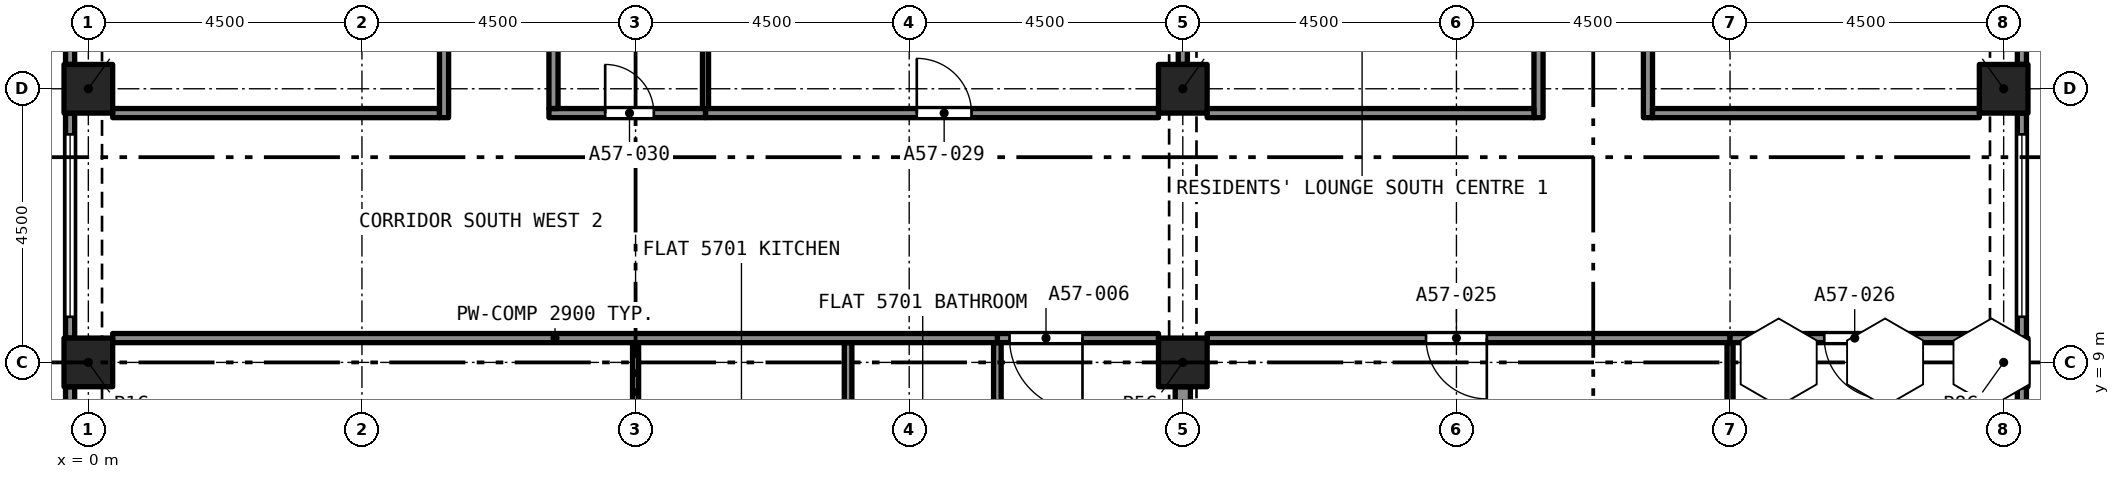
"""IFC4 building model, lengths in metres.
Left out: names, types, materials, properties, quantities, classifications, styles, units other than length and angle.
Written with IfcOpenShell. Run it as: python <this file> out.ifc"""

import sys

from ifc_helpers import new_model, si_unit, direction, frame, frame_2d, origin, origin_2d, place, context, subcontext, project, spatial, rectangle, extrude, element, fill, save


model = new_model("IFC4")
c1 = context("Model", 3, precision=1e-05, world=origin(), true_north=direction((0.0, 1.0)))
c2 = subcontext(c1, "Body", "Model", "MODEL_VIEW")
j1 = project(units=[si_unit("LENGTHUNIT", "METRE"), si_unit("PLANEANGLEUNIT", "RADIAN")], contexts=[c1])
p1 = place(None, origin())
s1 = spatial("IfcSite", under=j1, at=p1, CompositionType="ELEMENT")
p2 = place(p1, origin())
s2 = spatial("IfcBuilding", under=s1, at=p2, CompositionType="ELEMENT")
p3 = place(p2, frame((0.0, 0.0, 206.895)))
s3 = spatial("IfcBuildingStorey", under=s2, at=p3, CompositionType="ELEMENT", Elevation=206.895)
for number, where, z_axis, x_axis in (
    (1, (0.0, 9.0, 0.0), (0.0, 0.0, 1.0), (1.0, 0.0, 0.0)),
    (2, (18.0, 9.0, 0.0), (0.0, 0.0, 1.0), (1.0, 0.0, 0.0)),
    (3, (31.5, 9.0, 0.0), (0.0, 0.0, 1.0), (1.0, 0.0, 0.0)),
    (4, (0.0, 13.5, 0.0), (0.0, 0.0, 1.0), (1.0, 0.0, 0.0)),
    (5, (18.0, 13.5, 0.0), (0.0, 0.0, 1.0), (1.0, 0.0, 0.0)),
    (6, (31.5, 13.5, 0.0), (0.0, 0.0, 1.0), (1.0, 0.0, 0.0)),
):
    element("IfcColumn", number, at=place(p3, frame(where, z_axis=z_axis, x_axis=x_axis)), inside=s3, PredefinedType="COLUMN", context=c2, shape_type="SweptSolid", body=[
        extrude(rectangle(XDim=0.8, YDim=0.8, at=origin_2d()), origin(), (0.0, 0.0, 1.0), 3.2),
    ])
p4 = place(p3, frame((31.8, 8.6, 0.0), z_axis=(0.0, 0.0, 1.0), x_axis=(0.0, -1.0, 0.0)))
e7 = element("IfcWall", 7, at=p4, inside=s3, PredefinedType="SOLIDWALL", context=c2, shape_type="SweptSolid", body=[
    extrude(rectangle(XDim=3.7, YDim=0.15, at=frame_2d((1.85, 0.0))), origin(), (0.0, 0.0, 1.0), 3.2),
])
p5 = place(p4, frame((0.35, 0.0, 0.45)))
e8 = element("IfcOpeningElement", 8, at=p5, cuts=e7, PredefinedType="OPENING", context=c2, shape_type="SweptSolid", body=[
    extrude(rectangle(XDim=3.0, YDim=1.95, at=frame_2d((1.5, 0.975))), frame((0.0, 0.085, 0.0), z_axis=(0.0, -1.0, 0.0), x_axis=(1.0, 0.0, 0.0)), (0.0, 0.0, 1.0), 0.17),
])
p6 = place(p3, frame((31.8, 13.1, 0.0), z_axis=(0.0, 0.0, 1.0), x_axis=(0.0, -1.0, 0.0)))
e9 = element("IfcWall", 9, at=p6, inside=s3, PredefinedType="SOLIDWALL", context=c2, shape_type="SweptSolid", body=[
    extrude(rectangle(XDim=3.7, YDim=0.15, at=frame_2d((1.85, 0.0))), origin(), (0.0, 0.0, 1.0), 3.2),
])
p7 = place(p6, frame((0.35, 0.0, 0.45)))
e10 = element("IfcOpeningElement", 10, at=p7, cuts=e9, PredefinedType="OPENING", context=c2, shape_type="SweptSolid", body=[
    extrude(rectangle(XDim=3.0, YDim=1.95, at=frame_2d((1.5, 0.975))), frame((0.0, 0.085, 0.0), z_axis=(0.0, -1.0, 0.0), x_axis=(1.0, 0.0, 0.0)), (0.0, 0.0, 1.0), 0.17),
])
p8 = place(p3, frame((31.8, 17.6, 0.0), z_axis=(0.0, 0.0, 1.0), x_axis=(0.0, -1.0, 0.0)))
e11 = element("IfcWall", 11, at=p8, inside=s3, PredefinedType="SOLIDWALL", context=c2, shape_type="SweptSolid", body=[
    extrude(rectangle(XDim=3.7, YDim=0.15, at=frame_2d((1.85, 0.0))), origin(), (0.0, 0.0, 1.0), 3.2),
])
p9 = place(p8, frame((0.35, 0.0, 0.45)))
e12 = element("IfcOpeningElement", 12, at=p9, cuts=e11, PredefinedType="OPENING", context=c2, shape_type="SweptSolid", body=[
    extrude(rectangle(XDim=3.0, YDim=1.95, at=frame_2d((1.5, 0.975))), frame((0.0, 0.085, 0.0), z_axis=(0.0, -1.0, 0.0), x_axis=(1.0, 0.0, 0.0)), (0.0, 0.0, 1.0), 0.17),
])
p10 = place(p3, frame((-0.3, 13.9, 0.0), z_axis=(0.0, 0.0, 1.0), x_axis=(0.0, 1.0, 0.0)))
e13 = element("IfcWall", 13, at=p10, inside=s3, PredefinedType="SOLIDWALL", context=c2, shape_type="SweptSolid", body=[
    extrude(rectangle(XDim=3.7, YDim=0.15, at=frame_2d((1.85, 0.0))), origin(), (0.0, 0.0, 1.0), 3.2),
])
p11 = place(p10, frame((0.35, 0.0, 0.45)))
e14 = element("IfcOpeningElement", 14, at=p11, cuts=e13, PredefinedType="OPENING", context=c2, shape_type="SweptSolid", body=[
    extrude(rectangle(XDim=3.0, YDim=1.95, at=frame_2d((1.5, 0.975))), frame((0.0, 0.085, 0.0), z_axis=(0.0, -1.0, 0.0), x_axis=(1.0, 0.0, 0.0)), (0.0, 0.0, 1.0), 0.17),
])
p12 = place(p3, frame((-0.3, 9.4, 0.0), z_axis=(0.0, 0.0, 1.0), x_axis=(0.0, 1.0, 0.0)))
e15 = element("IfcWall", 15, at=p12, inside=s3, PredefinedType="SOLIDWALL", context=c2, shape_type="SweptSolid", body=[
    extrude(rectangle(XDim=3.7, YDim=0.15, at=frame_2d((1.85, 0.0))), origin(), (0.0, 0.0, 1.0), 3.2),
])
p13 = place(p12, frame((0.35, 0.0, 0.45)))
e16 = element("IfcOpeningElement", 16, at=p13, cuts=e15, PredefinedType="OPENING", context=c2, shape_type="SweptSolid", body=[
    extrude(rectangle(XDim=3.0, YDim=1.95, at=frame_2d((1.5, 0.975))), frame((0.0, 0.085, 0.0), z_axis=(0.0, -1.0, 0.0), x_axis=(1.0, 0.0, 0.0)), (0.0, 0.0, 1.0), 0.17),
])
p14 = place(p3, frame((-0.3, 4.9, 0.0), z_axis=(0.0, 0.0, 1.0), x_axis=(0.0, 1.0, 0.0)))
e17 = element("IfcWall", 17, at=p14, inside=s3, PredefinedType="SOLIDWALL", context=c2, shape_type="SweptSolid", body=[
    extrude(rectangle(XDim=3.7, YDim=0.15, at=frame_2d((1.85, 0.0))), origin(), (0.0, 0.0, 1.0), 3.2),
])
p15 = place(p14, frame((0.35, 0.0, 0.45)))
e18 = element("IfcOpeningElement", 18, at=p15, cuts=e17, PredefinedType="OPENING", context=c2, shape_type="SweptSolid", body=[
    extrude(rectangle(XDim=3.0, YDim=1.95, at=frame_2d((1.5, 0.975))), frame((0.0, 0.085, 0.0), z_axis=(0.0, -1.0, 0.0), x_axis=(1.0, 0.0, 0.0)), (0.0, 0.0, 1.0), 0.17),
])
for number, where, z_axis, x_axis in (
    (19, (14.95, 5.883, 0.0), (0.0, 0.0, 1.0), (0.0, 1.0, 0.0)),
    (20, (12.495, 5.883, 0.0), (0.0, 0.0, 1.0), (0.0, 1.0, 0.0)),
):
    element("IfcWall", number, at=place(p3, frame(where, z_axis=z_axis, x_axis=x_axis)), inside=s3, PredefinedType="PARTITIONING", context=c2, shape_type="SweptSolid", body=[
        extrude(rectangle(XDim=3.442, YDim=0.125, at=frame_2d((1.721, 0.0))), origin(), (0.0, 0.0, 1.0), 2.9),
    ])
p16 = place(p3, frame((18.0, 4.9, 0.0), z_axis=(0.0, 0.0, 1.0), x_axis=(0.0, 1.0, 0.0)))
e21 = element("IfcWall", 21, at=p16, inside=s3, PredefinedType="PARTITIONING", context=c2, shape_type="SweptSolid", body=[
    extrude(rectangle(XDim=3.7, YDim=0.25, at=frame_2d((1.85, 0.0))), origin(), (0.0, 0.0, 1.0), 2.38),
])
p17 = place(p3, frame((17.6, 9.4, 0.0), z_axis=(0.0, 0.0, 1.0), x_axis=(-1.0, 0.0, 0.0)))
e22 = element("IfcWall", 22, at=p17, inside=s3, PredefinedType="PARTITIONING", context=c2, shape_type="SweptSolid", body=[
    extrude(rectangle(XDim=2.65, YDim=0.15, at=frame_2d((1.325, 0.0))), origin(), (0.0, 0.0, 1.0), 2.9),
])
p18 = place(p17, frame((1.25, 0.0, 0.0)))
e23 = element("IfcOpeningElement", 23, at=p18, cuts=e22, PredefinedType="OPENING", context=c2, shape_type="SweptSolid", body=[
    extrude(rectangle(XDim=1.2, YDim=2.4, at=frame_2d((0.6, 1.2))), frame((0.0, 0.085, 0.0), z_axis=(0.0, -1.0, 0.0), x_axis=(1.0, 0.0, 0.0)), (0.0, 0.0, 1.0), 0.17),
])
p19 = place(p3, frame((9.0, 5.82, 0.0), z_axis=(0.0, 0.0, 1.0), x_axis=(0.0, 1.0, 0.0)))
e24 = element("IfcWall", 24, at=p19, inside=s3, PredefinedType="PARTITIONING", context=c2, shape_type="SweptSolid", body=[
    extrude(rectangle(XDim=3.505, YDim=0.1, at=frame_2d((1.752, 0.0))), origin(), (0.0, 0.0, 1.0), 2.9),
])
p20 = place(p3, frame((0.4, 9.4, 0.0), z_axis=(0.0, 0.0, 1.0), x_axis=(1.0, 0.0, 0.0)))
e25 = element("IfcWall", 25, at=p20, inside=s3, PredefinedType="PARTITIONING", context=c2, shape_type="SweptSolid", body=[
    extrude(rectangle(XDim=14.55, YDim=0.15, at=frame_2d((7.275, 0.0))), origin(), (0.0, 0.0, 1.0), 2.9),
])
p21 = place(p3, frame((27.0, 0.433, 0.0), z_axis=(0.0, 0.0, 1.0), x_axis=(0.0, 1.0, 0.0)))
e26 = element("IfcWall", 26, at=p21, inside=s3, PredefinedType="PARTITIONING", context=c2, shape_type="SweptSolid", body=[
    extrude(rectangle(XDim=8.892, YDim=0.1, at=frame_2d((4.446, 0.0))), origin(), (0.0, 0.0, 1.0), 2.75),
])
p22 = place(p3, frame((27.0, 9.4, 0.0), z_axis=(0.0, 0.0, 1.0), x_axis=(-1.0, 0.0, 0.0)))
e27 = element("IfcWall", 27, at=p22, inside=s3, PredefinedType="PARTITIONING", context=c2, shape_type="SweptSolid", body=[
    extrude(rectangle(XDim=8.6, YDim=0.15, at=frame_2d((4.3, 0.0))), origin(), (0.0, 0.0, 1.0), 2.75),
])
p23 = place(p22, frame((4.0, 0.0, 0.0)))
e28 = element("IfcOpeningElement", 28, at=p23, cuts=e27, PredefinedType="OPENING", context=c2, shape_type="SweptSolid", body=[
    extrude(rectangle(XDim=1.0, YDim=2.1, at=frame_2d((0.5, 1.05))), frame((0.0, 0.085, 0.0), z_axis=(0.0, -1.0, 0.0), x_axis=(1.0, 0.0, 0.0)), (0.0, 0.0, 1.0), 0.17),
])
p24 = place(p3, frame((31.1, 9.4, 0.0), z_axis=(0.0, 0.0, 1.0), x_axis=(-1.0, 0.0, 0.0)))
e29 = element("IfcWall", 29, at=p24, inside=s3, PredefinedType="PARTITIONING", context=c2, shape_type="SweptSolid", body=[
    extrude(rectangle(XDim=4.1, YDim=0.15, at=frame_2d((2.05, 0.0))), origin(), (0.0, 0.0, 1.0), 2.75),
])
p25 = place(p24, frame((1.55, 0.0, 0.0)))
e30 = element("IfcOpeningElement", 30, at=p25, cuts=e29, PredefinedType="OPENING", context=c2, shape_type="SweptSolid", body=[
    extrude(rectangle(XDim=1.0, YDim=2.1, at=frame_2d((0.5, 1.05))), frame((0.0, 0.085, 0.0), z_axis=(0.0, -1.0, 0.0), x_axis=(1.0, 0.0, 0.0)), (0.0, 0.0, 1.0), 0.17),
])
p26 = place(p3, frame((23.85, 13.025, 0.0), z_axis=(0.0, 0.0, 1.0), x_axis=(0.0, 1.0, 0.0)))
e31 = element("IfcWall", 31, at=p26, inside=s3, PredefinedType="PARTITIONING", context=c2, shape_type="SweptSolid", body=[
    extrude(rectangle(XDim=9.55, YDim=0.15, at=frame_2d((4.775, 0.0))), origin(), (0.0, 0.0, 1.0), 2.75),
])
p27 = place(p26, frame((4.275, 0.0, 0.0)))
e32 = element("IfcOpeningElement", 32, at=p27, cuts=e31, PredefinedType="OPENING", context=c2, shape_type="SweptSolid", body=[
    extrude(rectangle(XDim=1.0, YDim=2.1, at=frame_2d((0.5, 1.05))), frame((0.0, 0.085, 0.0), z_axis=(0.0, -1.0, 0.0), x_axis=(1.0, 0.0, 0.0)), (0.0, 0.0, 1.0), 0.17),
])
p28 = place(p3, frame((25.65, 22.575, 0.0), z_axis=(0.0, 0.0, 1.0), x_axis=(0.0, -1.0, 0.0)))
e33 = element("IfcWall", 33, at=p28, inside=s3, PredefinedType="PARTITIONING", context=c2, shape_type="SweptSolid", body=[
    extrude(rectangle(XDim=9.55, YDim=0.15, at=frame_2d((4.775, 0.0))), origin(), (0.0, 0.0, 1.0), 2.75),
])
p29 = place(p28, frame((4.275, 0.0, 0.0)))
e34 = element("IfcOpeningElement", 34, at=p29, cuts=e33, PredefinedType="OPENING", context=c2, shape_type="SweptSolid", body=[
    extrude(rectangle(XDim=1.0, YDim=2.1, at=frame_2d((0.5, 1.05))), frame((0.0, 0.085, 0.0), z_axis=(0.0, -1.0, 0.0), x_axis=(1.0, 0.0, 0.0)), (0.0, 0.0, 1.0), 0.17),
])
for number, where, z_axis, x_axis in (
    (35, (18.4, 13.1, 0.0), (0.0, 0.0, 1.0), (1.0, 0.0, 0.0)),
    (36, (25.725, 13.1, 0.0), (0.0, 0.0, 1.0), (1.0, 0.0, 0.0)),
):
    element("IfcWall", number, at=place(p3, frame(where, z_axis=z_axis, x_axis=x_axis)), inside=s3, PredefinedType="PARTITIONING", context=c2, shape_type="SweptSolid", body=[
        extrude(rectangle(XDim=5.375, YDim=0.15, at=frame_2d((2.688, 0.0))), origin(), (0.0, 0.0, 1.0), 2.75),
    ])
p30 = place(p3, frame((10.15, 13.1, 0.0), z_axis=(0.0, 0.0, 1.0), x_axis=(1.0, 0.0, 0.0)))
e37 = element("IfcWall", 37, at=p30, inside=s3, PredefinedType="PARTITIONING", context=c2, shape_type="SweptSolid", body=[
    extrude(rectangle(XDim=7.45, YDim=0.15, at=frame_2d((3.725, 0.0))), origin(), (0.0, 0.0, 1.0), 2.9),
])
p31 = place(p30, frame((3.475, 0.0, 0.0)))
e38 = element("IfcOpeningElement", 38, at=p31, cuts=e37, PredefinedType="OPENING", context=c2, shape_type="SweptSolid", body=[
    extrude(rectangle(XDim=0.9, YDim=2.1, at=frame_2d((0.45, 1.05))), frame((0.0, 0.085, 0.0), z_axis=(0.0, -1.0, 0.0), x_axis=(1.0, 0.0, 0.0)), (0.0, 0.0, 1.0), 0.17),
])
p32 = place(p3, frame((7.575, 13.1, 0.0), z_axis=(0.0, 0.0, 1.0), x_axis=(1.0, 0.0, 0.0)))
e39 = element("IfcWall", 39, at=p32, inside=s3, PredefinedType="PARTITIONING", context=c2, shape_type="SweptSolid", body=[
    extrude(rectangle(XDim=2.575, YDim=0.15, at=frame_2d((1.288, 0.0))), origin(), (0.0, 0.0, 1.0), 2.9),
])
p33 = place(p32, frame((0.925, 0.0, 0.0)))
e40 = element("IfcOpeningElement", 40, at=p33, cuts=e39, PredefinedType="OPENING", context=c2, shape_type="SweptSolid", body=[
    extrude(rectangle(XDim=0.8, YDim=2.1, at=frame_2d((0.4, 1.05))), frame((0.0, 0.085, 0.0), z_axis=(0.0, -1.0, 0.0), x_axis=(1.0, 0.0, 0.0)), (0.0, 0.0, 1.0), 0.17),
])
p34 = place(p3, frame((0.4, 13.1, 0.0), z_axis=(0.0, 0.0, 1.0), x_axis=(1.0, 0.0, 0.0)))
e41 = element("IfcWall", 41, at=p34, inside=s3, PredefinedType="PARTITIONING", context=c2, shape_type="SweptSolid", body=[
    extrude(rectangle(XDim=5.375, YDim=0.15, at=frame_2d((2.688, 0.0))), origin(), (0.0, 0.0, 1.0), 2.9),
])
p35 = place(p3, frame((18.0, 13.9, 0.0), z_axis=(0.0, 0.0, 1.0), x_axis=(0.0, 1.0, 0.0)))
e42 = element("IfcWall", 42, at=p35, inside=s3, PredefinedType="PARTITIONING", context=c2, shape_type="SweptSolid", body=[
    extrude(rectangle(XDim=3.4, YDim=0.15, at=frame_2d((1.7, 0.0))), origin(), (0.0, 0.0, 1.0), 2.38),
])
p36 = place(p3, frame((7.65, 13.175, 0.0), z_axis=(0.0, 0.0, 1.0), x_axis=(0.0, 1.0, 0.0)))
e43 = element("IfcWall", 43, at=p36, inside=s3, PredefinedType="PARTITIONING", context=c2, shape_type="SweptSolid", body=[
    extrude(rectangle(XDim=4.125, YDim=0.15, at=frame_2d((2.062, 0.0))), origin(), (0.0, 0.0, 1.0), 2.9),
])
p37 = place(p3, frame((5.85, 13.025, 0.0), z_axis=(0.0, 0.0, 1.0), x_axis=(0.0, 1.0, 0.0)))
e44 = element("IfcWall", 44, at=p37, inside=s3, PredefinedType="PARTITIONING", context=c2, shape_type="SweptSolid", body=[
    extrude(rectangle(XDim=9.475, YDim=0.15, at=frame_2d((4.738, 0.0))), origin(), (0.0, 0.0, 1.0), 2.9),
])
p38 = place(p37, frame((4.275, 0.0, 0.0)))
e45 = element("IfcOpeningElement", 45, at=p38, cuts=e44, PredefinedType="OPENING", context=c2, shape_type="SweptSolid", body=[
    extrude(rectangle(XDim=1.0, YDim=2.1, at=frame_2d((0.5, 1.05))), frame((0.0, 0.085, 0.0), z_axis=(0.0, -1.0, 0.0), x_axis=(1.0, 0.0, 0.0)), (0.0, 0.0, 1.0), 0.17),
])
p39 = place(p3, frame((10.15, 13.175, 0.0), z_axis=(0.0, 0.0, 1.0), x_axis=(0.0, 1.0, 0.0)))
e46 = element("IfcWall", 46, at=p39, inside=s3, PredefinedType="PARTITIONING", context=c2, shape_type="SweptSolid", body=[
    extrude(rectangle(XDim=4.05, YDim=0.1, at=frame_2d((2.025, 0.0))), origin(), (0.0, 0.0, 1.0), 2.9),
])
p40 = place(p7, origin())
e47 = element("IfcWindow", 47, at=p40, inside=s3, PartitioningType="SINGLE_PANEL", PredefinedType="WINDOW", context=c2, shape_type="SweptSolid", body=[
    extrude(rectangle(XDim=3.0, YDim=1.95, at=frame_2d((1.5, 0.975))), frame((0.0, 0.03, 0.0), z_axis=(0.0, -1.0, 0.0), x_axis=(1.0, 0.0, 0.0)), (0.0, 0.0, 1.0), 0.06),
])
fill(e10, e47)
p41 = place(p13, origin())
e48 = element("IfcWindow", 48, at=p41, inside=s3, PartitioningType="SINGLE_PANEL", PredefinedType="WINDOW", context=c2, shape_type="SweptSolid", body=[
    extrude(rectangle(XDim=3.0, YDim=1.95, at=frame_2d((1.5, 0.975))), frame((0.0, 0.03, 0.0), z_axis=(0.0, -1.0, 0.0), x_axis=(1.0, 0.0, 0.0)), (0.0, 0.0, 1.0), 0.06),
])
fill(e16, e48)
p42 = place(p18, origin())
e49 = element("IfcDoor", 49, at=p42, inside=s3, OperationType="SINGLE_SWING_RIGHT", PredefinedType="DOOR", context=c2, shape_type="SweptSolid", body=[
    extrude(rectangle(XDim=1.2, YDim=2.4, at=frame_2d((0.6, 1.2))), frame((0.0, 0.025, 0.0), z_axis=(0.0, -1.0, 0.0), x_axis=(1.0, 0.0, 0.0)), (0.0, 0.0, 1.0), 0.05),
])
fill(e23, e49)
p43 = place(p23, origin())
e50 = element("IfcDoor", 50, at=p43, inside=s3, OperationType="SINGLE_SWING_RIGHT", PredefinedType="DOOR", context=c2, shape_type="SweptSolid", body=[
    extrude(rectangle(XDim=1.0, YDim=2.1, at=frame_2d((0.5, 1.05))), frame((0.0, 0.025, 0.0), z_axis=(0.0, -1.0, 0.0), x_axis=(1.0, 0.0, 0.0)), (0.0, 0.0, 1.0), 0.05),
])
fill(e28, e50)
p44 = place(p25, origin())
e51 = element("IfcDoor", 51, at=p44, inside=s3, OperationType="SINGLE_SWING_RIGHT", PredefinedType="DOOR", context=c2, shape_type="SweptSolid", body=[
    extrude(rectangle(XDim=1.0, YDim=2.1, at=frame_2d((0.5, 1.05))), frame((0.0, 0.025, 0.0), z_axis=(0.0, -1.0, 0.0), x_axis=(1.0, 0.0, 0.0)), (0.0, 0.0, 1.0), 0.05),
])
fill(e30, e51)
p45 = place(p31, origin())
e52 = element("IfcDoor", 52, at=p45, inside=s3, OperationType="SINGLE_SWING_RIGHT", PredefinedType="DOOR", context=c2, shape_type="SweptSolid", body=[
    extrude(rectangle(XDim=0.9, YDim=2.1, at=frame_2d((0.45, 1.05))), frame((0.0, 0.025, 0.0), z_axis=(0.0, -1.0, 0.0), x_axis=(1.0, 0.0, 0.0)), (0.0, 0.0, 1.0), 0.05),
])
fill(e38, e52)
p46 = place(p33, origin())
e53 = element("IfcDoor", 53, at=p46, inside=s3, OperationType="SINGLE_SWING_RIGHT", PredefinedType="DOOR", context=c2, shape_type="SweptSolid", body=[
    extrude(rectangle(XDim=0.8, YDim=2.1, at=frame_2d((0.4, 1.05))), frame((0.0, 0.025, 0.0), z_axis=(0.0, -1.0, 0.0), x_axis=(1.0, 0.0, 0.0)), (0.0, 0.0, 1.0), 0.05),
])
fill(e40, e53)
save(model, sys.argv[1])
